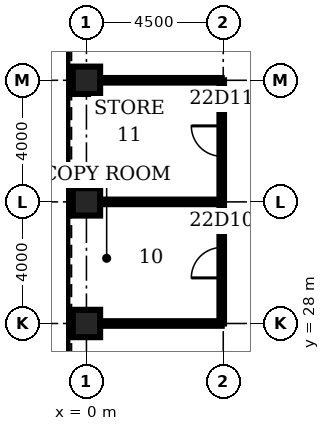
"""IFC4 building model, lengths in metres.
Left out: names, types, materials, properties, quantities, classifications, styles, units other than length and angle.
Written with IfcOpenShell. Run it as: python <this file> out.ifc"""

import sys

from ifc_helpers import new_model, si_unit, direction, frame, frame_2d, origin, origin_2d, place, context, subcontext, project, spatial, rectangle, hollow_rectangle, extrude, element, fill, save


model = new_model("IFC4")
c1 = context("Model", 3, precision=1e-05, world=origin(), true_north=direction((0.0, 1.0)))
c2 = subcontext(c1, "Body", "Model", "MODEL_VIEW")
j1 = project(units=[si_unit("LENGTHUNIT", "METRE"), si_unit("PLANEANGLEUNIT", "RADIAN")], contexts=[c1])
p1 = place(None, origin())
s1 = spatial("IfcSite", under=j1, at=p1, CompositionType="ELEMENT")
p2 = place(p1, origin())
s2 = spatial("IfcBuilding", under=s1, at=p2, CompositionType="ELEMENT")
p3 = place(p2, frame((0.0, 0.0, 104.7)))
s3 = spatial("IfcBuildingStorey", under=s2, at=p3, CompositionType="ELEMENT", Elevation=104.7)
for number, where, z_axis, x_axis in (
    (1, (0.0, 36.0, 0.0), (0.0, 0.0, 1.0), (1.0, 0.0, 0.0)),
    (2, (0.0, 32.0, 0.0), (0.0, 0.0, 1.0), (1.0, 0.0, 0.0)),
    (3, (0.0, 28.0, 0.0), (0.0, 0.0, 1.0), (1.0, 0.0, 0.0)),
):
    element("IfcColumn", number, at=place(p3, frame(where, z_axis=z_axis, x_axis=x_axis)), inside=s3, PredefinedType="COLUMN", context=c2, shape_type="SweptSolid", body=[
        extrude(hollow_rectangle(XDim=0.9, YDim=0.9, WallThickness=0.11, at=origin_2d()), origin(), (0.0, 0.0, 1.0), 4.2),
    ])
for number, where, z_axis, x_axis in (
    (4, (0.45, 28.0, 0.0), (0.0, 0.0, 1.0), (1.0, 0.0, 0.0)),
    (5, (0.45, 32.0, 0.0), (0.0, 0.0, 1.0), (1.0, 0.0, 0.0)),
    (6, (0.45, 36.0, 0.0), (0.0, 0.0, 1.0), (1.0, 0.0, 0.0)),
):
    element("IfcWall", number, at=place(p3, frame(where, z_axis=z_axis, x_axis=x_axis)), inside=s3, PredefinedType="PARTITIONING", context=c2, shape_type="SweptSolid", body=[
        extrude(rectangle(XDim=4.0, YDim=0.15, at=frame_2d((2.0, 0.0))), origin(), (0.0, 0.0, 1.0), 3.0),
    ])
p4 = place(p3, frame((4.45, 28.0, 0.0), z_axis=(0.0, 0.0, 1.0), x_axis=(0.0, 1.0, 0.0)))
e7 = element("IfcWall", 7, at=p4, inside=s3, PredefinedType="PARTITIONING", context=c2, shape_type="SweptSolid", body=[
    extrude(rectangle(XDim=8.0, YDim=0.15, at=frame_2d((4.0, 0.0))), origin(), (0.0, 0.0, 1.0), 3.0),
])
p5 = place(p4, frame((1.5, 0.0, 0.0)))
e8 = element("IfcOpeningElement", 8, at=p5, cuts=e7, PredefinedType="OPENING", context=c2, shape_type="SweptSolid", body=[
    extrude(rectangle(XDim=1.0, YDim=2.1, at=frame_2d((0.5, 1.05))), frame((0.0, 0.085, 0.0), z_axis=(0.0, -1.0, 0.0), x_axis=(1.0, 0.0, 0.0)), (0.0, 0.0, 1.0), 0.17),
])
p6 = place(p4, frame((5.5, 0.0, 0.0)))
e9 = element("IfcOpeningElement", 9, at=p6, cuts=e7, PredefinedType="OPENING", context=c2, shape_type="SweptSolid", body=[
    extrude(rectangle(XDim=1.0, YDim=2.1, at=frame_2d((0.5, 1.05))), frame((0.0, 0.085, 0.0), z_axis=(0.0, -1.0, 0.0), x_axis=(1.0, 0.0, 0.0)), (0.0, 0.0, 1.0), 0.17),
])
p7 = place(p5, origin())
e10 = element("IfcDoor", 10, at=p7, inside=s3, OperationType="SINGLE_SWING_LEFT", PredefinedType="DOOR", context=c2, shape_type="SweptSolid", body=[
    extrude(rectangle(XDim=1.0, YDim=2.1, at=frame_2d((0.5, 1.05))), frame((0.0, 0.025, 0.0), z_axis=(0.0, -1.0, 0.0), x_axis=(1.0, 0.0, 0.0)), (0.0, 0.0, 1.0), 0.05),
])
fill(e8, e10)
p8 = place(p6, origin())
e11 = element("IfcDoor", 11, at=p8, inside=s3, OperationType="SINGLE_SWING_RIGHT", PredefinedType="DOOR", context=c2, shape_type="SweptSolid", body=[
    extrude(rectangle(XDim=1.0, YDim=2.1, at=frame_2d((0.5, 1.05))), frame((0.0, 0.025, 0.0), z_axis=(0.0, -1.0, 0.0), x_axis=(1.0, 0.0, 0.0)), (0.0, 0.0, 1.0), 0.05),
])
fill(e9, e11)
save(model, sys.argv[1])
